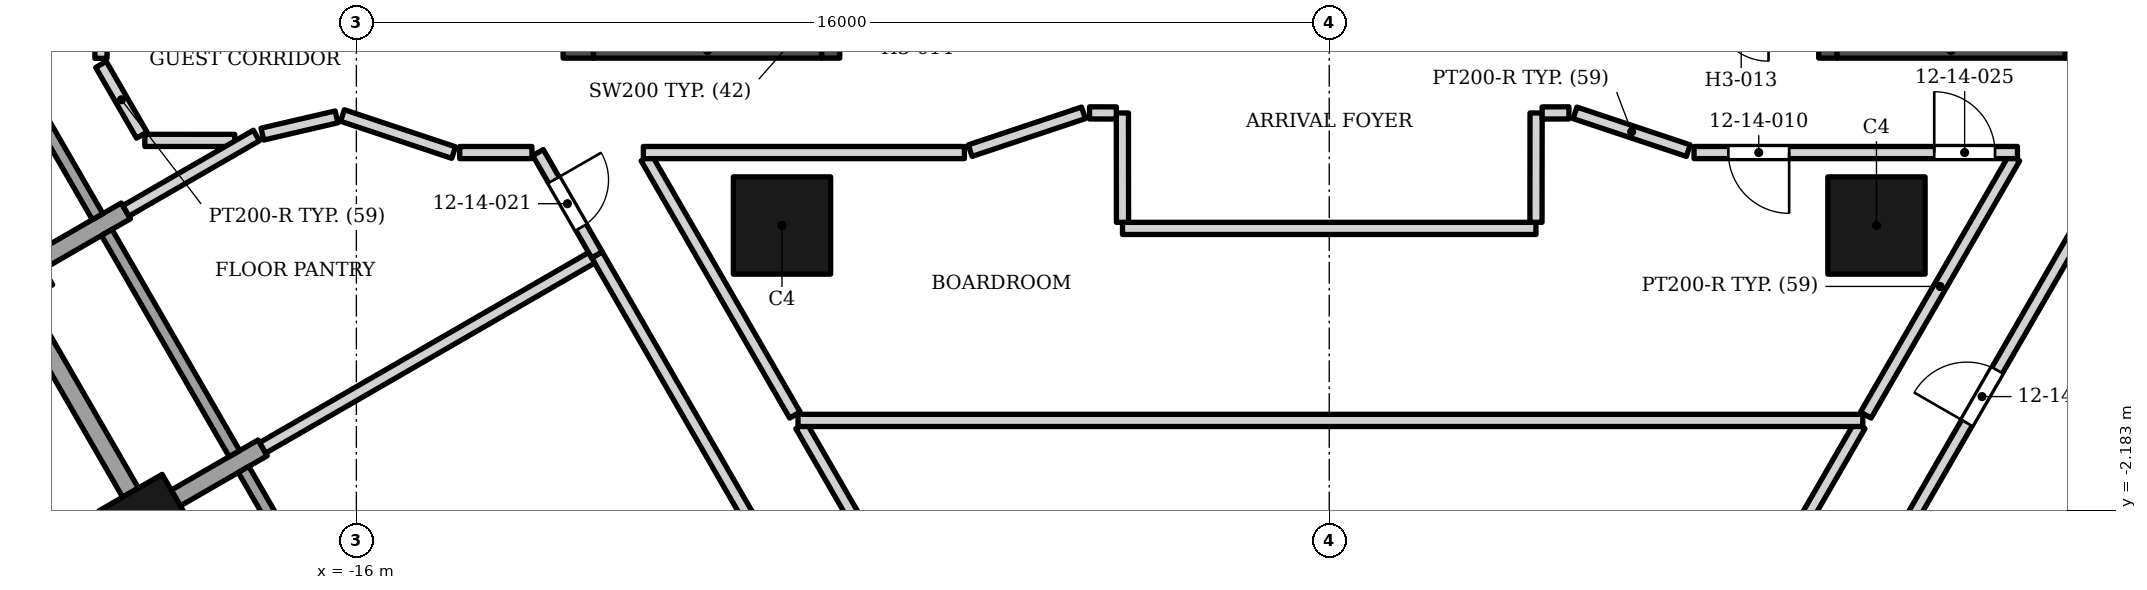
"""IFC4 building model, lengths in metres.
Left out: names, types, materials, properties, quantities, classifications, styles, units other than length and angle.
Written with IfcOpenShell. Run it as: python <this file> out.ifc"""

import sys

from ifc_helpers import new_model, si_unit, direction, frame, frame_2d, origin, origin_2d, place, context, subcontext, project, spatial, rectangle, extrude, element, fill, save


model = new_model("IFC4")
c1 = context("Model", 3, precision=1e-05, world=origin(), true_north=direction((0.0, 1.0)))
c2 = subcontext(c1, "Body", "Model", "MODEL_VIEW")
j1 = project(units=[si_unit("LENGTHUNIT", "METRE"), si_unit("PLANEANGLEUNIT", "RADIAN")], contexts=[c1])
p1 = place(None, origin())
s1 = spatial("IfcSite", under=j1, at=p1, CompositionType="ELEMENT")
p2 = place(p1, origin())
s2 = spatial("IfcBuilding", under=s1, at=p2, CompositionType="ELEMENT")
p3 = place(p2, frame((0.0, 0.0, 66.4)))
s3 = spatial("IfcBuildingStorey", under=s2, at=p3, CompositionType="ELEMENT", Elevation=66.4)
p4 = place(p3, frame((-12.35, 5.253, 0.0), z_axis=(0.0, 0.0, 1.0), x_axis=(0.0, 1.0, 0.0)))
e1 = element("IfcWall", 1, at=p4, inside=s3, PredefinedType="SHEAR", context=c2, shape_type="SweptSolid", body=[
    extrude(rectangle(XDim=13.3, YDim=0.5, at=frame_2d((6.65, 0.0))), origin(), (0.0, 0.0, 1.0), 3.4),
])
p5 = place(p3, frame((-8.2, 5.253, 0.0), z_axis=(0.0, 0.0, 1.0), x_axis=(0.0, 1.0, 0.0)))
e2 = element("IfcWall", 2, at=p5, inside=s3, PredefinedType="SHEAR", context=c2, shape_type="SweptSolid", body=[
    extrude(rectangle(XDim=13.3, YDim=0.3, at=frame_2d((6.65, 0.0))), origin(), (0.0, 0.0, 1.0), 3.4),
])
p6 = place(p5, frame((7.1, 0.0, 0.0)))
e3 = element("IfcOpeningElement", 3, at=p6, cuts=e2, PredefinedType="OPENING", context=c2, shape_type="SweptSolid", body=[
    extrude(rectangle(XDim=1.4, YDim=2.1, at=frame_2d((0.7, 1.05))), frame((0.0, 0.16, 0.0), z_axis=(0.0, -1.0, 0.0), x_axis=(1.0, 0.0, 0.0)), (0.0, 0.0, 1.0), 0.32),
])
p7 = place(p5, frame((5.05, 0.0, 0.0)))
e4 = element("IfcOpeningElement", 4, at=p7, cuts=e2, PredefinedType="OPENING", context=c2, shape_type="SweptSolid", body=[
    extrude(rectangle(XDim=1.4, YDim=2.1, at=frame_2d((0.7, 1.05))), frame((0.0, 0.16, 0.0), z_axis=(0.0, -1.0, 0.0), x_axis=(1.0, 0.0, 0.0)), (0.0, 0.0, 1.0), 0.32),
])
p8 = place(p3, frame((-12.1, 5.378, 0.0), z_axis=(0.0, 0.0, 1.0), x_axis=(1.0, 0.0, 0.0)))
e5 = element("IfcWall", 5, at=p8, inside=s3, PredefinedType="SHEAR", context=c2, shape_type="SweptSolid", body=[
    extrude(rectangle(XDim=3.75, YDim=0.25, at=frame_2d((1.875, 0.0))), origin(), (0.0, 0.0, 1.0), 3.4),
])
p9 = place(p3, frame((12.35, 5.253, 0.0), z_axis=(0.0, 0.0, 1.0), x_axis=(0.0, 1.0, 0.0)))
e6 = element("IfcWall", 6, at=p9, inside=s3, PredefinedType="SHEAR", context=c2, shape_type="SweptSolid", body=[
    extrude(rectangle(XDim=13.3, YDim=0.5, at=frame_2d((6.65, 0.0))), origin(), (0.0, 0.0, 1.0), 3.4),
])
p10 = place(p3, frame((8.2, 5.253, 0.0), z_axis=(0.0, 0.0, 1.0), x_axis=(0.0, 1.0, 0.0)))
e7 = element("IfcWall", 7, at=p10, inside=s3, PredefinedType="SHEAR", context=c2, shape_type="SweptSolid", body=[
    extrude(rectangle(XDim=13.3, YDim=0.3, at=frame_2d((6.65, 0.0))), origin(), (0.0, 0.0, 1.0), 3.4),
])
p11 = place(p10, frame((7.1, 0.0, 0.0)))
e8 = element("IfcOpeningElement", 8, at=p11, cuts=e7, PredefinedType="OPENING", context=c2, shape_type="SweptSolid", body=[
    extrude(rectangle(XDim=1.4, YDim=2.1, at=frame_2d((0.7, 1.05))), frame((0.0, 0.16, 0.0), z_axis=(0.0, -1.0, 0.0), x_axis=(1.0, 0.0, 0.0)), (0.0, 0.0, 1.0), 0.32),
])
p12 = place(p10, frame((5.05, 0.0, 0.0)))
e9 = element("IfcOpeningElement", 9, at=p12, cuts=e7, PredefinedType="OPENING", context=c2, shape_type="SweptSolid", body=[
    extrude(rectangle(XDim=1.4, YDim=2.1, at=frame_2d((0.7, 1.05))), frame((0.0, 0.16, 0.0), z_axis=(0.0, -1.0, 0.0), x_axis=(1.0, 0.0, 0.0)), (0.0, 0.0, 1.0), 0.32),
])
p13 = place(p3, frame((8.35, 5.378, 0.0), z_axis=(0.0, 0.0, 1.0), x_axis=(1.0, 0.0, 0.0)))
e10 = element("IfcWall", 10, at=p13, inside=s3, PredefinedType="SHEAR", context=c2, shape_type="SweptSolid", body=[
    extrude(rectangle(XDim=3.75, YDim=0.25, at=frame_2d((1.875, 0.0))), origin(), (0.0, 0.0, 1.0), 3.4),
])
for number, where, z_axis, x_axis in (
    (11, (-9.0, 2.5, 0.0), (0.0, 0.0, 1.0), (1.0, 0.0, 0.0)),
    (12, (9.0, 2.5, 0.0), (0.0, 0.0, 1.0), (1.0, 0.0, 0.0)),
):
    element("IfcColumn", number, at=place(p3, frame(where, z_axis=z_axis, x_axis=x_axis)), inside=s3, PredefinedType="COLUMN", context=c2, shape_type="SweptSolid", body=[
        extrude(rectangle(XDim=1.6, YDim=1.6, at=origin_2d()), origin(), (0.0, 0.0, 1.0), 3.4),
    ])
p14 = place(p3, frame((-19.489, -2.282, 0.0), z_axis=(0.0, 0.0, 1.0), x_axis=(0.5, -0.866025403784, 0.0)))
e13 = element("IfcColumn", 13, at=p14, inside=s3, PredefinedType="COLUMN", context=c2, shape_type="SweptSolid", body=[
    extrude(rectangle(XDim=0.9, YDim=1.2, at=origin_2d()), origin(), (0.0, 0.0, 1.0), 3.4),
])
p15 = place(p3, frame((-21.22, 1.916, 0.0), z_axis=(0.0, 0.0, 1.0), x_axis=(-0.866006032174, -0.500033551112, 0.0)))
e14 = element("IfcWall", 14, at=p15, inside=s3, PredefinedType="SOLIDWALL", context=c2, shape_type="SweptSolid", body=[
    extrude(rectangle(XDim=1.2, YDim=0.9, at=frame_2d((0.6, 0.0))), origin(), (0.0, 0.0, 1.0), 2.63),
])
for number, where, z_axis, x_axis in (
    (15, (-19.791, 2.74, 0.0), (0.0, 0.0, 1.0), (-0.866, -0.5, 0.0)),
    (16, (-17.541, -1.157, 0.0), (0.0, 0.0, 1.0), (-0.866, -0.5, 0.0)),
):
    element("IfcWall", number, at=place(p3, frame(where, z_axis=z_axis, x_axis=x_axis)), inside=s3, PredefinedType="SOLIDWALL", context=c2, shape_type="SweptSolid", body=[
        extrude(rectangle(XDim=1.65, YDim=0.3, at=frame_2d((0.825, 0.0))), origin(), (0.0, 0.0, 1.0), 2.65),
    ])
p16 = place(p3, frame((-22.355, 6.283, 0.0), z_axis=(0.0, 0.0, 1.0), x_axis=(0.49998411664, -0.866034573852, 0.0)))
e17 = element("IfcWall", 17, at=p16, inside=s3, PredefinedType="ELEMENTEDWALL", context=c2, shape_type="SweptSolid", body=[
    extrude(rectangle(XDim=4.2, YDim=0.2, at=frame_2d((2.1, 0.0))), origin(), (0.0, 0.0, 1.0), 2.45),
])
p17 = place(p3, frame((-21.514, 1.226, 0.0), z_axis=(0.0, 0.0, 1.0), x_axis=(0.500012057535, -0.866018442252, 0.0)))
e18 = element("IfcWall", 18, at=p17, inside=s3, PredefinedType="SOLIDWALL", context=c2, shape_type="SweptSolid", body=[
    extrude(rectangle(XDim=3.6, YDim=0.3, at=frame_2d((1.8, 0.0))), origin(), (0.0, 0.0, 1.0), 2.63),
])
for number, where, z_axis, x_axis in (
    (19, (-20.105, 2.385, 0.0), (0.0, 0.0, 1.0), (0.5, -0.866, 0.0)),
    (20, (-17.855, -1.511, 0.0), (0.0, 0.0, 1.0), (0.5, -0.866, 0.0)),
):
    element("IfcWall", number, at=place(p3, frame(where, z_axis=z_axis, x_axis=x_axis)), inside=s3, PredefinedType="ELEMENTEDWALL", context=c2, shape_type="SweptSolid", body=[
        extrude(rectangle(XDim=4.2, YDim=0.2, at=frame_2d((2.1, 0.0))), origin(), (0.0, 0.0, 1.0), 2.65),
    ])
p18 = place(p3, frame((-12.043, 2.017, 0.0), z_axis=(0.0, 0.0, 1.0), x_axis=(0.5000018851, -0.866024315419, 0.0)))
e21 = element("IfcWall", 21, at=p18, inside=s3, PredefinedType="PARTITIONING", context=c2, shape_type="SweptSolid", body=[
    extrude(rectangle(XDim=18.0, YDim=0.2, at=frame_2d((9.0, 0.0))), origin(), (0.0, 0.0, 1.0), 2.374),
])
p19 = place(p18, frame((5.95, 0.0, 0.0)))
e22 = element("IfcOpeningElement", 22, at=p19, cuts=e21, PredefinedType="OPENING", context=c2, shape_type="SweptSolid", body=[
    extrude(rectangle(XDim=1.6, YDim=2.1, at=frame_2d((0.8, 1.05))), frame((0.0, 0.11, 0.0), z_axis=(0.0, -1.0, 0.0), x_axis=(1.0, 0.0, 0.0)), (0.0, 0.0, 1.0), 0.22),
])
p20 = place(p18, frame((14.0, 0.0, 0.0)))
e23 = element("IfcOpeningElement", 23, at=p20, cuts=e21, PredefinedType="OPENING", context=c2, shape_type="SweptSolid", body=[
    extrude(rectangle(XDim=1.1, YDim=2.1, at=frame_2d((0.55, 1.05))), frame((0.0, 0.11, 0.0), z_axis=(0.0, -1.0, 0.0), x_axis=(1.0, 0.0, 0.0)), (0.0, 0.0, 1.0), 0.22),
])
p21 = place(p3, frame((4.688, -7.782, 0.0), z_axis=(0.0, 0.0, 1.0), x_axis=(0.499996438971, 0.866027459735, 0.0)))
e24 = element("IfcWall", 24, at=p21, inside=s3, PredefinedType="PARTITIONING", context=c2, shape_type="SweptSolid", body=[
    extrude(rectangle(XDim=8.073, YDim=0.2, at=frame_2d((4.037, 0.0))), origin(), (0.0, 0.0, 1.0), 2.384),
])
p22 = place(p3, frame((-17.541, -1.156, 0.0), z_axis=(0.0, 0.0, 1.0), x_axis=(0.865906436394, 0.500206000974, 0.0)))
e25 = element("IfcWall", 25, at=p22, inside=s3, PredefinedType="PARTITIONING", context=c2, shape_type="SweptSolid", body=[
    extrude(rectangle(XDim=6.249, YDim=0.2, at=frame_2d((3.125, 0.0))), origin(), (0.0, 0.0, 1.0), 2.384),
])
p23 = place(p3, frame((-8.686, -0.79, 0.0), z_axis=(0.0, 0.0, 1.0), x_axis=(0.499814962183, -0.866132209064, 0.0)))
e26 = element("IfcWall", 26, at=p23, inside=s3, PredefinedType="PARTITIONING", context=c2, shape_type="SweptSolid", body=[
    extrude(rectangle(XDim=8.072, YDim=0.2, at=frame_2d((4.036, 0.0))), origin(), (0.0, 0.0, 1.0), 2.384),
])
p24 = place(p23, frame((5.939, 0.0, 0.0)))
e27 = element("IfcOpeningElement", 27, at=p24, cuts=e26, PredefinedType="OPENING", context=c2, shape_type="SweptSolid", body=[
    extrude(rectangle(XDim=1.0, YDim=2.1, at=frame_2d((0.5, 1.05))), frame((0.0, 0.11, 0.0), z_axis=(0.0, -1.0, 0.0), x_axis=(1.0, 0.0, 0.0)), (0.0, 0.0, 1.0), 0.22),
])
p25 = place(p23, frame((2.657, 0.0, 0.0)))
e28 = element("IfcOpeningElement", 28, at=p25, cuts=e26, PredefinedType="OPENING", context=c2, shape_type="SweptSolid", body=[
    extrude(rectangle(XDim=1.0, YDim=2.1, at=frame_2d((0.5, 1.05))), frame((0.0, 0.11, 0.0), z_axis=(0.0, -1.0, 0.0), x_axis=(1.0, 0.0, 0.0)), (0.0, 0.0, 1.0), 0.22),
])
p26 = place(p3, frame((-8.737, -0.706, 0.0), z_axis=(0.0, 0.0, 1.0), x_axis=(1.0, 0.0, 0.0)))
e29 = element("IfcWall", 29, at=p26, inside=s3, PredefinedType="PARTITIONING", context=c2, shape_type="SweptSolid", body=[
    extrude(rectangle(XDim=17.512, YDim=0.2, at=frame_2d((8.756, 0.0))), origin(), (0.0, 0.0, 1.0), 2.384),
])
p27 = place(p3, frame((8.824, -0.617, 0.0), z_axis=(0.0, 0.0, 1.0), x_axis=(0.500271769931, 0.865868440475, 0.0)))
e30 = element("IfcWall", 30, at=p27, inside=s3, PredefinedType="PARTITIONING", context=c2, shape_type="SweptSolid", body=[
    extrude(rectangle(XDim=4.885, YDim=0.2, at=frame_2d((2.443, 0.0))), origin(), (0.0, 0.0, 1.0), 2.552),
])
p28 = place(p3, frame((-13.013, 3.699, 0.0), z_axis=(0.0, 0.0, 1.0), x_axis=(0.499265012286, -0.866449333491, 0.0)))
e31 = element("IfcWall", 31, at=p28, inside=s3, PredefinedType="PARTITIONING", context=c2, shape_type="SweptSolid", body=[
    extrude(rectangle(XDim=1.941, YDim=0.2, at=frame_2d((0.97, 0.0))), origin(), (0.0, 0.0, 1.0), 3.23),
])
p29 = place(p28, frame((0.521, 0.0, 0.0)))
e32 = element("IfcOpeningElement", 32, at=p29, cuts=e31, PredefinedType="OPENING", context=c2, shape_type="SweptSolid", body=[
    extrude(rectangle(XDim=0.9, YDim=2.1, at=frame_2d((0.45, 1.05))), frame((0.0, 0.11, 0.0), z_axis=(0.0, -1.0, 0.0), x_axis=(1.0, 0.0, 0.0)), (0.0, 0.0, 1.0), 0.22),
])
p30 = place(p3, frame((-3.4, 2.452, 0.0), z_axis=(0.0, 0.0, 1.0), x_axis=(1.0, 0.0, 0.0)))
e33 = element("IfcWall", 33, at=p30, inside=s3, PredefinedType="PARTITIONING", context=c2, shape_type="SweptSolid", body=[
    extrude(rectangle(XDim=6.8, YDim=0.2, at=frame_2d((3.4, 0.0))), origin(), (0.0, 0.0, 1.0), 2.474),
])
p31 = place(p3, frame((-3.402, 4.351, 0.0), z_axis=(0.0, 0.0, 1.0), x_axis=(0.001086217961, -0.999999410065, 0.0)))
e34 = element("IfcWall", 34, at=p31, inside=s3, PredefinedType="PARTITIONING", context=c2, shape_type="SweptSolid", body=[
    extrude(rectangle(XDim=1.798, YDim=0.2, at=frame_2d((0.899, 0.0))), origin(), (0.0, 0.0, 1.0), 3.23),
])
p32 = place(p3, frame((2.686, -14.257, 0.0), z_axis=(0.0, 0.0, 1.0), x_axis=(0.49998850195, 0.866032042085, 0.0)))
e35 = element("IfcWall", 35, at=p32, inside=s3, PredefinedType="PARTITIONING", context=c2, shape_type="SweptSolid", body=[
    extrude(rectangle(XDim=20.6, YDim=0.2, at=frame_2d((10.3, 0.0))), origin(), (0.0, 0.0, 1.0), 2.302),
])
p33 = place(p32, frame((9.7, 0.0, 0.0)))
e36 = element("IfcOpeningElement", 36, at=p33, cuts=e35, PredefinedType="OPENING", context=c2, shape_type="SweptSolid", body=[
    extrude(rectangle(XDim=1.1, YDim=2.1, at=frame_2d((0.55, 1.05))), frame((0.0, 0.11, 0.0), z_axis=(0.0, -1.0, 0.0), x_axis=(1.0, 0.0, 0.0)), (0.0, 0.0, 1.0), 0.22),
])
p34 = place(p32, frame((15.6, 0.0, 0.0)))
e37 = element("IfcOpeningElement", 37, at=p34, cuts=e35, PredefinedType="OPENING", context=c2, shape_type="SweptSolid", body=[
    extrude(rectangle(XDim=1.0, YDim=2.1, at=frame_2d((0.5, 1.05))), frame((0.0, 0.11, 0.0), z_axis=(0.0, -1.0, 0.0), x_axis=(1.0, 0.0, 0.0)), (0.0, 0.0, 1.0), 0.22),
])
p35 = place(p3, frame((-11.23, 3.613, 0.0), z_axis=(0.0, 0.0, 1.0), x_axis=(0.49997195544, -0.866041594713, 0.0)))
e38 = element("IfcWall", 38, at=p35, inside=s3, PredefinedType="PARTITIONING", context=c2, shape_type="SweptSolid", body=[
    extrude(rectangle(XDim=4.885, YDim=0.2, at=frame_2d((2.442, 0.0))), origin(), (0.0, 0.0, 1.0), 2.552),
])
p36 = place(p3, frame((-16.229, 4.309, 0.0), z_axis=(0.0, 0.0, 1.0), x_axis=(0.948657960303, -0.316303769112, 0.0)))
e39 = element("IfcWall", 39, at=p36, inside=s3, PredefinedType="PARTITIONING", context=c2, shape_type="SweptSolid", body=[
    extrude(rectangle(XDim=1.927, YDim=0.2, at=frame_2d((0.964, 0.0))), origin(), (0.0, 0.0, 1.0), 3.23),
])
p37 = place(p3, frame((-14.3, 3.699, 0.0), z_axis=(0.0, 0.0, 1.0), x_axis=(1.0, 0.0, 0.0)))
e40 = element("IfcWall", 40, at=p37, inside=s3, PredefinedType="PARTITIONING", context=c2, shape_type="SweptSolid", body=[
    extrude(rectangle(XDim=1.188, YDim=0.2, at=frame_2d((0.594, 0.0))), origin(), (0.0, 0.0, 1.0), 2.384),
])
p38 = place(p3, frame((-11.28, 3.7, 0.0), z_axis=(0.0, 0.0, 1.0), x_axis=(1.0, 0.0, 0.0)))
e41 = element("IfcWall", 41, at=p38, inside=s3, PredefinedType="PARTITIONING", context=c2, shape_type="SweptSolid", body=[
    extrude(rectangle(XDim=5.28, YDim=0.2, at=frame_2d((2.64, 0.0))), origin(), (0.0, 0.0, 1.0), 2.832),
])
p39 = place(p3, frame((6.0, 3.7, 0.0), z_axis=(0.0, 0.0, 1.0), x_axis=(1.0, 0.0, 0.0)))
e42 = element("IfcWall", 42, at=p39, inside=s3, PredefinedType="PARTITIONING", context=c2, shape_type="SweptSolid", body=[
    extrude(rectangle(XDim=5.319, YDim=0.2, at=frame_2d((2.659, 0.0))), origin(), (0.0, 0.0, 1.0), 2.832),
])
p40 = place(p39, frame((0.564, 0.0, 0.0)))
e43 = element("IfcOpeningElement", 43, at=p40, cuts=e42, PredefinedType="OPENING", context=c2, shape_type="SweptSolid", body=[
    extrude(rectangle(XDim=1.0, YDim=2.1, at=frame_2d((0.5, 1.05))), frame((0.0, 0.11, 0.0), z_axis=(0.0, -1.0, 0.0), x_axis=(1.0, 0.0, 0.0)), (0.0, 0.0, 1.0), 0.22),
])
p41 = place(p39, frame((3.95, 0.0, 0.0)))
e44 = element("IfcOpeningElement", 44, at=p41, cuts=e42, PredefinedType="OPENING", context=c2, shape_type="SweptSolid", body=[
    extrude(rectangle(XDim=1.0, YDim=2.1, at=frame_2d((0.5, 1.05))), frame((0.0, 0.11, 0.0), z_axis=(0.0, -1.0, 0.0), x_axis=(1.0, 0.0, 0.0)), (0.0, 0.0, 1.0), 0.22),
])
p42 = place(p3, frame((4.042, 4.352, 0.0), z_axis=(0.0, 0.0, 1.0), x_axis=(0.948695731075, -0.316190464499, 0.0)))
e45 = element("IfcWall", 45, at=p42, inside=s3, PredefinedType="PARTITIONING", context=c2, shape_type="SweptSolid", body=[
    extrude(rectangle(XDim=1.964, YDim=0.2, at=frame_2d((0.982, 0.0))), origin(), (0.0, 0.0, 1.0), 2.384),
])
p43 = place(p3, frame((-19.479, 3.9, 0.0), z_axis=(0.0, 0.0, 1.0), x_axis=(0.999999986376, -0.000165070978, 0.0)))
e46 = element("IfcWall", 46, at=p43, inside=s3, PredefinedType="PARTITIONING", context=c2, shape_type="SweptSolid", body=[
    extrude(rectangle(XDim=1.479, YDim=0.2, at=frame_2d((0.74, 0.0))), origin(), (0.0, 0.0, 1.0), 3.23),
])
p44 = place(p3, frame((-19.791, 2.74, 0.0), z_axis=(0.0, 0.0, 1.0), x_axis=(0.86605932655, 0.499941239442, 0.0)))
e47 = element("IfcWall", 47, at=p44, inside=s3, PredefinedType="PARTITIONING", context=c2, shape_type="SweptSolid", body=[
    extrude(rectangle(XDim=2.479, YDim=0.2, at=frame_2d((1.24, 0.0))), origin(), (0.0, 0.0, 1.0), 2.702),
])
p45 = place(p3, frame((-17.546, 4.003, 0.0), z_axis=(0.0, 0.0, 1.0), x_axis=(0.974055012808, 0.226311360791, 0.0)))
e48 = element("IfcWall", 48, at=p45, inside=s3, PredefinedType="PARTITIONING", context=c2, shape_type="SweptSolid", body=[
    extrude(rectangle(XDim=1.252, YDim=0.2, at=frame_2d((0.626, 0.0))), origin(), (0.0, 0.0, 1.0), 3.23),
])
p46 = place(p3, frame((-5.905, 3.731, 0.0), z_axis=(0.0, 0.0, 1.0), x_axis=(0.948695731075, 0.316190464499, 0.0)))
e49 = element("IfcWall", 49, at=p46, inside=s3, PredefinedType="PARTITIONING", context=c2, shape_type="SweptSolid", body=[
    extrude(rectangle(XDim=1.964, YDim=0.2, at=frame_2d((0.982, 0.0))), origin(), (0.0, 0.0, 1.0), 2.384),
])
p47 = place(p3, frame((-3.942, 4.352, 0.0), z_axis=(0.0, 0.0, 1.0), x_axis=(0.999996159087, -0.00277160798, 0.0)))
e50 = element("IfcWall", 50, at=p47, inside=s3, PredefinedType="PARTITIONING", context=c2, shape_type="SweptSolid", body=[
    extrude(rectangle(XDim=0.44, YDim=0.2, at=frame_2d((0.22, 0.0))), origin(), (0.0, 0.0, 1.0), 3.23),
])
p48 = place(p3, frame((3.4, 2.552, 0.0), z_axis=(0.0, 0.0, 1.0), x_axis=(0.001086217961, 0.999999410065, 0.0)))
e51 = element("IfcWall", 51, at=p48, inside=s3, PredefinedType="PARTITIONING", context=c2, shape_type="SweptSolid", body=[
    extrude(rectangle(XDim=1.798, YDim=0.2, at=frame_2d((0.899, 0.0))), origin(), (0.0, 0.0, 1.0), 3.23),
])
p49 = place(p3, frame((3.502, 4.351, 0.0), z_axis=(0.0, 0.0, 1.0), x_axis=(0.999996159087, 0.00277160798, 0.0)))
e52 = element("IfcWall", 52, at=p49, inside=s3, PredefinedType="PARTITIONING", context=c2, shape_type="SweptSolid", body=[
    extrude(rectangle(XDim=0.44, YDim=0.2, at=frame_2d((0.22, 0.0))), origin(), (0.0, 0.0, 1.0), 3.23),
])
p50 = place(p3, frame((-20.2, 5.149, 0.0), z_axis=(0.0, 0.0, 1.0), x_axis=(0.500011000363, -0.866019052629, 0.0)))
e53 = element("IfcWall", 53, at=p50, inside=s3, PredefinedType="PARTITIONING", context=c2, shape_type="SweptSolid", body=[
    extrude(rectangle(XDim=1.343, YDim=0.2, at=frame_2d((0.671, 0.0))), origin(), (0.0, 0.0, 1.0), 3.23),
])
p51 = place(p3, frame((-20.2, 6.153, 0.0), z_axis=(0.0, 0.0, 1.0), x_axis=(0.0, -1.0, 0.0)))
e54 = element("IfcWall", 54, at=p51, inside=s3, PredefinedType="PARTITIONING", context=c2, shape_type="SweptSolid", body=[
    extrude(rectangle(XDim=0.904, YDim=0.2, at=frame_2d((0.452, 0.0))), origin(), (0.0, 0.0, 1.0), 2.45),
])
p52 = place(p34, origin())
e55 = element("IfcDoor", 55, at=p52, inside=s3, OperationType="SINGLE_SWING_LEFT", PredefinedType="DOOR", context=c2, shape_type="SweptSolid", body=[
    extrude(rectangle(XDim=1.0, YDim=2.1, at=frame_2d((0.5, 1.05))), frame((0.0, 0.025, 0.0), z_axis=(0.0, -1.0, 0.0), x_axis=(1.0, 0.0, 0.0)), (0.0, 0.0, 1.0), 0.05),
])
fill(e37, e55)
p53 = place(p40, origin())
e56 = element("IfcDoor", 56, at=p53, inside=s3, OperationType="SINGLE_SWING_RIGHT", PredefinedType="DOOR", context=c2, shape_type="SweptSolid", body=[
    extrude(rectangle(XDim=1.0, YDim=2.1, at=frame_2d((0.5, 1.05))), frame((0.0, 0.025, 0.0), z_axis=(0.0, -1.0, 0.0), x_axis=(1.0, 0.0, 0.0)), (0.0, 0.0, 1.0), 0.05),
])
fill(e43, e56)
p54 = place(p29, origin())
e57 = element("IfcDoor", 57, at=p54, inside=s3, OperationType="SINGLE_SWING_LEFT", PredefinedType="DOOR", context=c2, shape_type="SweptSolid", body=[
    extrude(rectangle(XDim=0.9, YDim=2.1, at=frame_2d((0.45, 1.05))), frame((0.0, 0.025, 0.0), z_axis=(0.0, -1.0, 0.0), x_axis=(1.0, 0.0, 0.0)), (0.0, 0.0, 1.0), 0.05),
])
fill(e32, e57)
p55 = place(p41, origin())
e58 = element("IfcDoor", 58, at=p55, inside=s3, OperationType="SINGLE_SWING_LEFT", PredefinedType="DOOR", context=c2, shape_type="SweptSolid", body=[
    extrude(rectangle(XDim=1.0, YDim=2.1, at=frame_2d((0.5, 1.05))), frame((0.0, 0.025, 0.0), z_axis=(0.0, -1.0, 0.0), x_axis=(1.0, 0.0, 0.0)), (0.0, 0.0, 1.0), 0.05),
])
fill(e44, e58)
save(model, sys.argv[1])
